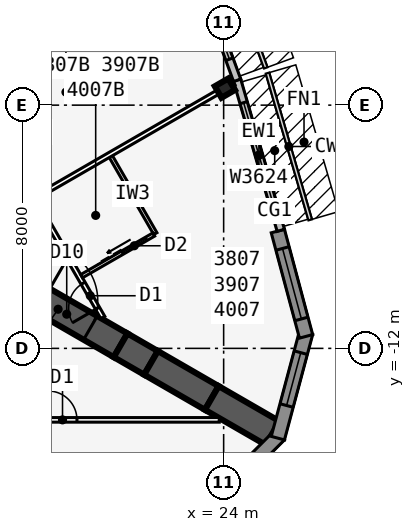
"""IFC4 building model, lengths in metres.
Left out: names, types, materials, properties, quantities, classifications, styles, units other than length and angle.
Written with IfcOpenShell. Run it as: python <this file> out.ifc"""

import sys

from ifc_helpers import new_model, si_unit, direction, frame, frame_2d, origin, origin_2d, place, context, subcontext, project, spatial, polyline, rectangle, i_section, outline, extrude, element, fill, save


model = new_model("IFC4")
c1 = context("Model", 3, precision=1e-05, world=origin(), true_north=direction((0.0, 1.0)))
c2 = subcontext(c1, "Body", "Model", "MODEL_VIEW")
j1 = project(units=[si_unit("LENGTHUNIT", "METRE"), si_unit("PLANEANGLEUNIT", "RADIAN")], contexts=[c1])
p1 = place(None, origin())
s1 = spatial("IfcSite", under=j1, at=p1, CompositionType="ELEMENT")
p2 = place(p1, origin())
s2 = spatial("IfcBuilding", under=s1, at=p2, CompositionType="ELEMENT")
p3 = place(p2, frame((0.0, 0.0, 145.3)))
s3 = spatial("IfcBuildingStorey", under=s2, at=p3, CompositionType="ELEMENT", Elevation=145.3)
p4 = place(p3, frame((16.5, -9.526, 0.0), z_axis=(0.0, 0.0, 1.0), x_axis=(0.866031398331, -0.499989616998, 0.0)))
e1 = element("IfcWall", 1, at=p4, inside=s3, PredefinedType="SHEAR", context=c2, shape_type="SweptSolid", body=[
    extrude(rectangle(XDim=4.746, YDim=0.9, at=frame_2d((2.373, 0.0))), origin(), (0.0, 0.0, 1.0), 3.4),
])
p5 = place(p4, frame((1.8, 0.0, 0.0)))
e2 = element("IfcOpeningElement", 2, at=p5, cuts=e1, PredefinedType="OPENING", context=c2, shape_type="SweptSolid", body=[
    extrude(rectangle(XDim=1.8, YDim=2.13, at=frame_2d((0.9, 1.065))), frame((0.0, 0.46, 0.0), z_axis=(0.0, -1.0, 0.0), x_axis=(1.0, 0.0, 0.0)), (0.0, 0.0, 1.0), 0.92),
])
p6 = place(p3, frame((20.61, -11.899, 0.0), z_axis=(0.0, 0.0, 1.0), x_axis=(0.866009537788, -0.500027479704, 0.0)))
e3 = element("IfcWall", 3, at=p6, inside=s3, PredefinedType="SHEAR", context=c2, shape_type="SweptSolid", body=[
    extrude(rectangle(XDim=1.155, YDim=0.9, at=frame_2d((0.577, 0.0))), origin(), (0.0, 0.0, 1.0), 3.4),
])
for number, where, z_axis, x_axis in (
    (4, (21.61, -12.477, 0.0), (0.0, 0.0, 1.0), (0.866, -0.5, 0.0)),
    (5, (23.61, -13.631, 0.0), (0.0, 0.0, 1.0), (0.866, -0.5, 0.0)),
):
    element("IfcWall", number, at=place(p3, frame(where, z_axis=z_axis, x_axis=x_axis)), inside=s3, PredefinedType="SHEAR", context=c2, shape_type="SweptSolid", body=[
        extrude(rectangle(XDim=2.309, YDim=0.9, at=frame_2d((1.155, 0.0))), origin(), (0.0, 0.0, 1.0), 3.4),
    ])
p7 = place(p3, frame((24.041, -3.44, 0.0), z_axis=(0.0, 0.0, 1.0), x_axis=(-0.5, 0.866025403784, 0.0)))
e6 = element("IfcColumn", 6, at=p7, inside=s3, PredefinedType="COLUMN", context=c2, shape_type="SweptSolid", body=[
    extrude(i_section(OverallWidth=0.437, OverallDepth=0.513, WebThickness=0.061, FlangeThickness=0.097, at=origin_2d()), origin(), (0.0, 0.0, 1.0), 3.4),
])
p8 = place(p3, frame((23.305, -17.388, 0.0), z_axis=(0.0, 0.0, 1.0), x_axis=(0.707106781187, 0.707106781187, 0.0)))
e7 = element("IfcWall", 7, at=p8, inside=s3, PredefinedType="SOLIDWALL", context=c2, shape_type="SweptSolid", body=[
    extrude(outline(polyline([(3.586, 0.225), (3.527, 0.225), (3.035, 0.093), (3.0, 0.225), (0.0, 0.225), (0.0, -0.225), (3.586, -0.225), (3.586, 0.225)])), origin(), (0.0, 0.0, 1.0), 3.235),
])
p9 = place(p8, frame((0.675, 0.0, 0.45)))
e8 = element("IfcOpeningElement", 8, at=p9, cuts=e7, PredefinedType="OPENING", context=c2, shape_type="SweptSolid", body=[
    extrude(rectangle(XDim=1.8, YDim=2.4, at=frame_2d((0.9, 1.2))), frame((0.0, 0.235, 0.0), z_axis=(0.0, -1.0, 0.0), x_axis=(1.0, 0.0, 0.0)), (0.0, 0.0, 1.0), 0.47),
])
p10 = place(p3, frame((25.783, -14.953, 0.0), z_axis=(0.0, 0.0, 1.0), x_axis=(0.258823421857, 0.965924653531, 0.0)))
e9 = element("IfcWall", 9, at=p10, inside=s3, PredefinedType="SOLIDWALL", context=c2, shape_type="SweptSolid", body=[
    extrude(outline(polyline([(3.586, 0.225), (0.586, 0.225), (0.551, 0.093), (0.06, 0.225), (0.0, 0.225), (0.0, -0.225), (3.586, -0.225), (3.586, 0.225)])), origin(), (0.0, 0.0, 1.0), 3.235),
])
p11 = place(p10, frame((1.111, 0.0, 0.45)))
e10 = element("IfcOpeningElement", 10, at=p11, cuts=e9, PredefinedType="OPENING", context=c2, shape_type="SweptSolid", body=[
    extrude(rectangle(XDim=1.8, YDim=2.4, at=frame_2d((0.9, 1.2))), frame((0.0, 0.235, 0.0), z_axis=(0.0, -1.0, 0.0), x_axis=(1.0, 0.0, 0.0)), (0.0, 0.0, 1.0), 0.47),
])
p12 = place(p3, frame((26.711, -11.605, 0.0), z_axis=(0.0, 0.0, 1.0), x_axis=(-0.258823421857, 0.965924653531, 0.0)))
e11 = element("IfcWall", 11, at=p12, inside=s3, PredefinedType="SOLIDWALL", context=c2, shape_type="SweptSolid", body=[
    extrude(rectangle(XDim=3.586, YDim=0.45, at=frame_2d((1.793, 0.0))), origin(), (0.0, 0.0, 1.0), 3.235),
])
p13 = place(p12, frame((0.593, 0.0, 0.45)))
e12 = element("IfcOpeningElement", 12, at=p13, cuts=e11, PredefinedType="OPENING", context=c2, shape_type="SweptSolid", body=[
    extrude(rectangle(XDim=2.4, YDim=2.4, at=frame_2d((1.2, 1.2))), frame((0.0, 0.235, 0.0), z_axis=(0.0, -1.0, 0.0), x_axis=(1.0, 0.0, 0.0)), (0.0, 0.0, 1.0), 0.47),
])
p14 = place(p3, frame((25.88, -8.118, 0.0), z_axis=(0.0, 0.0, 1.0), x_axis=(-0.279528287117, 0.960137457191, 0.0)))
e13 = element("IfcWall", 13, at=p14, inside=s3, PredefinedType="STANDARD", context=c2, shape_type="SweptSolid", body=[
    extrude(rectangle(XDim=5.148, YDim=0.25, at=frame_2d((2.574, 0.0))), origin(), (0.0, 0.0, 1.0), 3.235),
])
p15 = place(p14, frame((0.774, 0.0, 0.45)))
e14 = element("IfcOpeningElement", 14, at=p15, cuts=e13, PredefinedType="OPENING", context=c2, shape_type="SweptSolid", body=[
    extrude(rectangle(XDim=3.6, YDim=2.4, at=frame_2d((1.8, 1.2))), frame((0.0, 0.135, 0.0), z_axis=(0.0, -1.0, 0.0), x_axis=(1.0, 0.0, 0.0)), (0.0, 0.0, 1.0), 0.27),
])
p16 = place(p3, frame((24.444, -3.183, 0.0), z_axis=(0.0, 0.0, 1.0), x_axis=(-0.343225593282, 0.939252996863, 0.0)))
e15 = element("IfcWall", 15, at=p16, inside=s3, PredefinedType="STANDARD", context=c2, shape_type="SweptSolid", body=[
    extrude(rectangle(XDim=5.076, YDim=0.25, at=frame_2d((2.538, 0.0))), origin(), (0.0, 0.0, 1.0), 3.235),
])
p17 = place(p16, frame((0.738, 0.0, 0.45)))
e16 = element("IfcOpeningElement", 16, at=p17, cuts=e15, PredefinedType="OPENING", context=c2, shape_type="SweptSolid", body=[
    extrude(rectangle(XDim=3.6, YDim=2.4, at=frame_2d((1.8, 1.2))), frame((0.0, 0.135, 0.0), z_axis=(0.0, -1.0, 0.0), x_axis=(1.0, 0.0, 0.0)), (0.0, 0.0, 1.0), 0.27),
])
p18 = place(p3, frame((-23.857, -14.351, 0.0), z_axis=(0.0, 0.0, 1.0), x_axis=(1.0, 0.0, 0.0)))
e17 = element("IfcWall", 17, at=p18, inside=s3, PredefinedType="PARTITIONING", context=c2, shape_type="SweptSolid", body=[
    extrude(rectangle(XDim=47.714, YDim=0.15, at=frame_2d((23.857, 0.0))), origin(), (0.0, 0.0, 1.0), 3.235),
])
p19 = place(p18, frame((3.723, 0.0, 0.0)))
e18 = element("IfcOpeningElement", 18, at=p19, cuts=e17, PredefinedType="OPENING", context=c2, shape_type="SweptSolid", body=[
    extrude(rectangle(XDim=0.95, YDim=2.13, at=frame_2d((0.475, 1.065))), frame((0.0, 0.085, 0.0), z_axis=(0.0, -1.0, 0.0), x_axis=(1.0, 0.0, 0.0)), (0.0, 0.0, 1.0), 0.17),
])
p20 = place(p18, frame((17.082, 0.0, 0.0)))
e19 = element("IfcOpeningElement", 19, at=p20, cuts=e17, PredefinedType="OPENING", context=c2, shape_type="SweptSolid", body=[
    extrude(rectangle(XDim=0.95, YDim=2.13, at=frame_2d((0.475, 1.065))), frame((0.0, 0.085, 0.0), z_axis=(0.0, -1.0, 0.0), x_axis=(1.0, 0.0, 0.0)), (0.0, 0.0, 1.0), 0.17),
])
p21 = place(p18, frame((21.482, 0.0, 0.0)))
e20 = element("IfcOpeningElement", 20, at=p21, cuts=e17, PredefinedType="OPENING", context=c2, shape_type="SweptSolid", body=[
    extrude(rectangle(XDim=0.95, YDim=2.13, at=frame_2d((0.475, 1.065))), frame((0.0, 0.085, 0.0), z_axis=(0.0, -1.0, 0.0), x_axis=(1.0, 0.0, 0.0)), (0.0, 0.0, 1.0), 0.17),
])
p22 = place(p18, frame((25.857, 0.0, 0.0)))
e21 = element("IfcOpeningElement", 21, at=p22, cuts=e17, PredefinedType="OPENING", context=c2, shape_type="SweptSolid", body=[
    extrude(rectangle(XDim=1.0, YDim=2.13, at=frame_2d((0.5, 1.065))), frame((0.0, 0.085, 0.0), z_axis=(0.0, -1.0, 0.0), x_axis=(1.0, 0.0, 0.0)), (0.0, 0.0, 1.0), 0.17),
])
p23 = place(p18, frame((31.482, 0.0, 0.0)))
e22 = element("IfcOpeningElement", 22, at=p23, cuts=e17, PredefinedType="OPENING", context=c2, shape_type="SweptSolid", body=[
    extrude(rectangle(XDim=0.95, YDim=2.13, at=frame_2d((0.475, 1.065))), frame((0.0, 0.085, 0.0), z_axis=(0.0, -1.0, 0.0), x_axis=(1.0, 0.0, 0.0)), (0.0, 0.0, 1.0), 0.17),
])
p24 = place(p18, frame((36.482, 0.0, 0.0)))
e23 = element("IfcOpeningElement", 23, at=p24, cuts=e17, PredefinedType="OPENING", context=c2, shape_type="SweptSolid", body=[
    extrude(rectangle(XDim=0.95, YDim=2.13, at=frame_2d((0.475, 1.065))), frame((0.0, 0.085, 0.0), z_axis=(0.0, -1.0, 0.0), x_axis=(1.0, 0.0, 0.0)), (0.0, 0.0, 1.0), 0.17),
])
p25 = place(p18, frame((42.082, 0.0, 0.0)))
e24 = element("IfcOpeningElement", 24, at=p25, cuts=e17, PredefinedType="OPENING", context=c2, shape_type="SweptSolid", body=[
    extrude(rectangle(XDim=0.95, YDim=2.13, at=frame_2d((0.475, 1.065))), frame((0.0, 0.085, 0.0), z_axis=(0.0, -1.0, 0.0), x_axis=(1.0, 0.0, 0.0)), (0.0, 0.0, 1.0), 0.17),
])
p26 = place(p3, frame((20.027, -10.985, 0.0), z_axis=(0.0, 0.0, 1.0), x_axis=(-0.500001677587, 0.866024435227, 0.0)))
e25 = element("IfcWall", 25, at=p26, inside=s3, PredefinedType="PARTITIONING", context=c2, shape_type="SweptSolid", body=[
    extrude(rectangle(XDim=39.054, YDim=0.15, at=frame_2d((19.527, 0.0))), origin(), (0.0, 0.0, 1.0), 3.235),
])
p27 = place(p26, frame((0.352, 0.0, 0.0)))
e26 = element("IfcOpeningElement", 26, at=p27, cuts=e25, PredefinedType="OPENING", context=c2, shape_type="SweptSolid", body=[
    extrude(rectangle(XDim=0.95, YDim=2.13, at=frame_2d((0.475, 1.065))), frame((0.0, 0.085, 0.0), z_axis=(0.0, -1.0, 0.0), x_axis=(1.0, 0.0, 0.0)), (0.0, 0.0, 1.0), 0.17),
])
p28 = place(p26, frame((6.552, 0.0, 0.0)))
e27 = element("IfcOpeningElement", 27, at=p28, cuts=e25, PredefinedType="OPENING", context=c2, shape_type="SweptSolid", body=[
    extrude(rectangle(XDim=0.95, YDim=2.13, at=frame_2d((0.475, 1.065))), frame((0.0, 0.085, 0.0), z_axis=(0.0, -1.0, 0.0), x_axis=(1.0, 0.0, 0.0)), (0.0, 0.0, 1.0), 0.17),
])
p29 = place(p26, frame((17.152, 0.0, 0.0)))
e28 = element("IfcOpeningElement", 28, at=p29, cuts=e25, PredefinedType="OPENING", context=c2, shape_type="SweptSolid", body=[
    extrude(rectangle(XDim=0.95, YDim=2.13, at=frame_2d((0.475, 1.065))), frame((0.0, 0.085, 0.0), z_axis=(0.0, -1.0, 0.0), x_axis=(1.0, 0.0, 0.0)), (0.0, 0.0, 1.0), 0.17),
])
p30 = place(p26, frame((21.552, 0.0, 0.0)))
e29 = element("IfcOpeningElement", 29, at=p30, cuts=e25, PredefinedType="OPENING", context=c2, shape_type="SweptSolid", body=[
    extrude(rectangle(XDim=0.95, YDim=2.13, at=frame_2d((0.475, 1.065))), frame((0.0, 0.085, 0.0), z_axis=(0.0, -1.0, 0.0), x_axis=(1.0, 0.0, 0.0)), (0.0, 0.0, 1.0), 0.17),
])
p31 = place(p26, frame((32.152, 0.0, 0.0)))
e30 = element("IfcOpeningElement", 30, at=p31, cuts=e25, PredefinedType="OPENING", context=c2, shape_type="SweptSolid", body=[
    extrude(rectangle(XDim=0.95, YDim=2.13, at=frame_2d((0.475, 1.065))), frame((0.0, 0.085, 0.0), z_axis=(0.0, -1.0, 0.0), x_axis=(1.0, 0.0, 0.0)), (0.0, 0.0, 1.0), 0.17),
])
p32 = place(p26, frame((37.752, 0.0, 0.0)))
e31 = element("IfcOpeningElement", 31, at=p32, cuts=e25, PredefinedType="OPENING", context=c2, shape_type="SweptSolid", body=[
    extrude(rectangle(XDim=0.95, YDim=2.13, at=frame_2d((0.475, 1.065))), frame((0.0, 0.085, 0.0), z_axis=(0.0, -1.0, 0.0), x_axis=(1.0, 0.0, 0.0)), (0.0, 0.0, 1.0), 0.17),
])
p33 = place(p3, frame((17.829, -7.027, 0.0), z_axis=(0.0, 0.0, 1.0), x_axis=(0.866029804378, 0.499992377871, 0.0)))
e32 = element("IfcWall", 32, at=p33, inside=s3, PredefinedType="PARTITIONING", context=c2, shape_type="SweptSolid", body=[
    extrude(rectangle(XDim=7.516, YDim=0.15, at=frame_2d((3.758, 0.0))), origin(), (0.0, 0.0, 1.0), 2.389),
])
p34 = place(p3, frame((15.329, -2.697, 0.0), z_axis=(0.0, 0.0, 1.0), x_axis=(0.866024316602, 0.50000188305, 0.0)))
e33 = element("IfcWall", 33, at=p34, inside=s3, PredefinedType="PARTITIONING", context=c2, shape_type="SweptSolid", body=[
    extrude(rectangle(XDim=8.395, YDim=0.1, at=frame_2d((4.198, 0.0))), origin(), (0.0, 0.0, 1.0), 2.389),
])
p35 = place(p34, frame((0.45, 0.0, 0.0)))
e34 = element("IfcOpeningElement", 34, at=p35, cuts=e33, PredefinedType="OPENING", context=c2, shape_type="SweptSolid", body=[
    extrude(rectangle(XDim=0.9, YDim=2.13, at=frame_2d((0.45, 1.065))), frame((0.0, 0.06, 0.0), z_axis=(0.0, -1.0, 0.0), x_axis=(1.0, 0.0, 0.0)), (0.0, 0.0, 1.0), 0.12),
])
p36 = place(p3, frame((21.753, -8.225, 0.0), z_axis=(0.0, 0.0, 1.0), x_axis=(-0.499990139034, 0.866031096941, 0.0)))
e35 = element("IfcWall", 35, at=p36, inside=s3, PredefinedType="PLUMBINGWALL", context=c2, shape_type="SweptSolid", body=[
    extrude(rectangle(XDim=3.0, YDim=0.12, at=frame_2d((1.5, 0.0))), origin(), (0.0, 0.0, 1.0), 3.235),
])
p37 = place(p3, frame((19.329, -9.625, 0.0), z_axis=(0.0, 0.0, 1.0), x_axis=(0.866035715982, 0.499982138324, 0.0)))
e36 = element("IfcWall", 36, at=p37, inside=s3, PredefinedType="PLUMBINGWALL", context=c2, shape_type="SweptSolid", body=[
    extrude(rectangle(XDim=2.74, YDim=0.12, at=frame_2d((1.37, 0.0))), origin(), (0.0, 0.0, 1.0), 3.235),
])
p38 = place(p37, frame((1.55, 0.0, 0.0)))
e37 = element("IfcOpeningElement", 37, at=p38, cuts=e36, PredefinedType="OPENING", context=c2, shape_type="SweptSolid", body=[
    extrude(rectangle(XDim=0.9, YDim=2.13, at=frame_2d((0.45, 1.065))), frame((0.0, 0.07, 0.0), z_axis=(0.0, -1.0, 0.0), x_axis=(1.0, 0.0, 0.0)), (0.0, 0.0, 1.0), 0.14),
])
p39 = place(p11, origin())
e38 = element("IfcWindow", 38, at=p39, inside=s3, PartitioningType="SINGLE_PANEL", PredefinedType="WINDOW", context=c2, shape_type="SweptSolid", body=[
    extrude(rectangle(XDim=1.8, YDim=2.4, at=frame_2d((0.9, 1.2))), frame((0.0, 0.03, 0.0), z_axis=(0.0, -1.0, 0.0), x_axis=(1.0, 0.0, 0.0)), (0.0, 0.0, 1.0), 0.06),
])
fill(e10, e38)
p40 = place(p13, origin())
e39 = element("IfcWindow", 39, at=p40, inside=s3, PartitioningType="SINGLE_PANEL", PredefinedType="WINDOW", context=c2, shape_type="SweptSolid", body=[
    extrude(rectangle(XDim=2.4, YDim=2.4, at=frame_2d((1.2, 1.2))), frame((0.0, 0.03, 0.0), z_axis=(0.0, -1.0, 0.0), x_axis=(1.0, 0.0, 0.0)), (0.0, 0.0, 1.0), 0.06),
])
fill(e12, e39)
p41 = place(p15, origin())
e40 = element("IfcWindow", 40, at=p41, inside=s3, PartitioningType="SINGLE_PANEL", PredefinedType="WINDOW", context=c2, shape_type="SweptSolid", body=[
    extrude(rectangle(XDim=3.6, YDim=2.4, at=frame_2d((1.8, 1.2))), frame((0.0, 0.03, 0.0), z_axis=(0.0, -1.0, 0.0), x_axis=(1.0, 0.0, 0.0)), (0.0, 0.0, 1.0), 0.06),
])
fill(e14, e40)
p42 = place(p17, origin())
e41 = element("IfcWindow", 41, at=p42, inside=s3, PartitioningType="SINGLE_PANEL", PredefinedType="WINDOW", context=c2, shape_type="SweptSolid", body=[
    extrude(rectangle(XDim=3.6, YDim=2.4, at=frame_2d((1.8, 1.2))), frame((0.0, 0.03, 0.0), z_axis=(0.0, -1.0, 0.0), x_axis=(1.0, 0.0, 0.0)), (0.0, 0.0, 1.0), 0.06),
])
fill(e16, e41)
p43 = place(p25, origin())
e42 = element("IfcDoor", 42, at=p43, inside=s3, OperationType="SINGLE_SWING_LEFT", PredefinedType="DOOR", context=c2, shape_type="SweptSolid", body=[
    extrude(rectangle(XDim=0.95, YDim=2.13, at=frame_2d((0.475, 1.065))), frame((0.0, 0.025, 0.0), z_axis=(0.0, -1.0, 0.0), x_axis=(1.0, 0.0, 0.0)), (0.0, 0.0, 1.0), 0.05),
])
fill(e24, e42)
p44 = place(p38, origin())
e43 = element("IfcDoor", 43, at=p44, inside=s3, OperationType="SLIDING_TO_LEFT", PredefinedType="DOOR", context=c2, shape_type="SweptSolid", body=[
    extrude(rectangle(XDim=0.9, YDim=2.13, at=frame_2d((0.45, 1.065))), frame((0.0, 0.025, 0.0), z_axis=(0.0, -1.0, 0.0), x_axis=(1.0, 0.0, 0.0)), (0.0, 0.0, 1.0), 0.05),
])
fill(e37, e43)
p45 = place(p27, origin())
e44 = element("IfcDoor", 44, at=p45, inside=s3, OperationType="SINGLE_SWING_LEFT", PredefinedType="DOOR", context=c2, shape_type="SweptSolid", body=[
    extrude(rectangle(XDim=0.95, YDim=2.13, at=frame_2d((0.475, 1.065))), frame((0.0, 0.025, 0.0), z_axis=(0.0, -1.0, 0.0), x_axis=(1.0, 0.0, 0.0)), (0.0, 0.0, 1.0), 0.05),
])
fill(e26, e44)
p46 = place(p5, origin())
e45 = element("IfcDoor", 45, at=p46, inside=s3, OperationType="DOUBLE_DOOR_DOUBLE_SWING", PredefinedType="DOOR", context=c2, shape_type="SweptSolid", body=[
    extrude(rectangle(XDim=1.8, YDim=2.13, at=frame_2d((0.9, 1.065))), frame((0.0, 0.025, 0.0), z_axis=(0.0, -1.0, 0.0), x_axis=(1.0, 0.0, 0.0)), (0.0, 0.0, 1.0), 0.05),
])
fill(e2, e45)
save(model, sys.argv[1])
